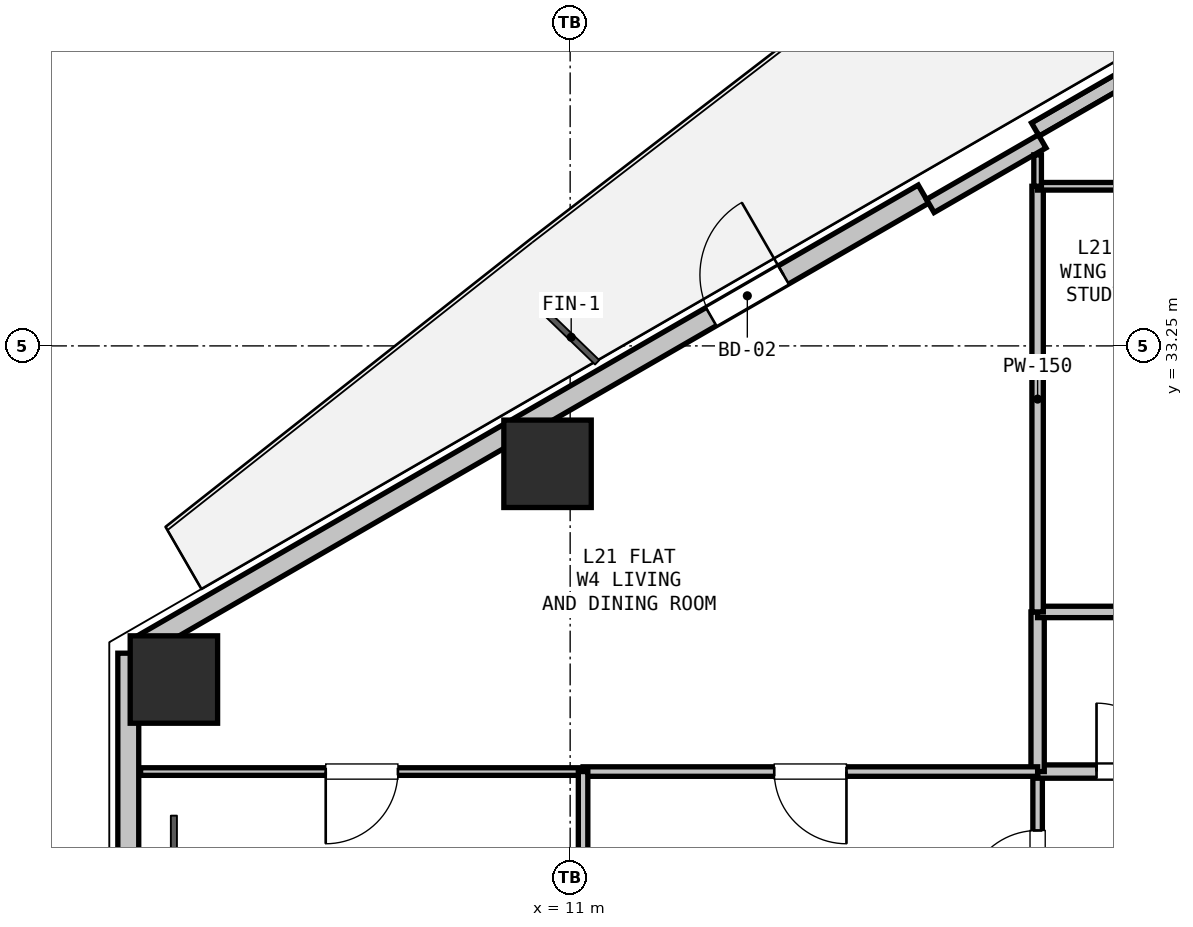
"""IFC4 building model, lengths in metres.
Left out: names, types, materials, properties, quantities, classifications, styles, units other than length and angle.
Written with IfcOpenShell. Run it as: python <this file> out.ifc"""

import sys

from ifc_helpers import new_model, si_unit, direction, frame, frame_2d, origin, origin_2d, place, context, subcontext, project, spatial, rectangle, hollow_rectangle, extrude, element, fill, save


model = new_model("IFC4")
c1 = context("Model", 3, precision=1e-05, world=origin(), true_north=direction((0.0, 1.0)))
c2 = subcontext(c1, "Body", "Model", "MODEL_VIEW")
j1 = project(units=[si_unit("LENGTHUNIT", "METRE"), si_unit("PLANEANGLEUNIT", "RADIAN")], contexts=[c1])
p1 = place(None, origin())
s1 = spatial("IfcSite", under=j1, at=p1, CompositionType="ELEMENT")
p2 = place(p1, origin())
s2 = spatial("IfcBuilding", under=s1, at=p2, CompositionType="ELEMENT")
p3 = place(p2, frame((0.0, 0.0, 80.1)))
s3 = spatial("IfcBuildingStorey", under=s2, at=p3, CompositionType="ELEMENT", Elevation=80.1)
for number, where, z_axis, x_axis in (
    (1, (5.787, 28.861, 0.0), (0.0, 0.0, 1.0), (1.0, 0.0, 0.0)),
    (2, (10.702, 31.699, 0.0), (0.0, 0.0, 1.0), (1.0, 0.0, 0.0)),
):
    element("IfcColumn", number, at=place(p3, frame(where, z_axis=z_axis, x_axis=x_axis)), inside=s3, PredefinedType="COLUMN", context=c2, shape_type="SweptSolid", body=[
        extrude(hollow_rectangle(XDim=1.15, YDim=1.15, WallThickness=0.032, at=origin_2d()), origin(), (0.0, 0.0, 1.0), 3.3),
    ])
p4 = place(p3, frame((5.187, 24.293, 0.0), z_axis=(0.0, 0.0, 1.0), x_axis=(0.0, 1.0, 0.0)))
e3 = element("IfcWall", 3, at=p4, inside=s3, PredefinedType="SOLIDWALL", context=c2, shape_type="SweptSolid", body=[
    extrude(rectangle(XDim=4.915, YDim=0.275, at=frame_2d((2.457, 0.0))), origin(), (0.0, 0.0, 1.0), 2.67),
])
p5 = place(p3, frame((5.317, 29.282, 0.0), z_axis=(0.0, 0.0, 1.0), x_axis=(0.866023023012, 0.500004123596, 0.0)))
e4 = element("IfcWall", 4, at=p5, inside=s3, PredefinedType="SOLIDWALL", context=c2, shape_type="SweptSolid", body=[
    extrude(rectangle(XDim=11.93, YDim=0.275, at=frame_2d((5.965, 0.0))), origin(), (0.0, 0.0, 1.0), 2.67),
])
p6 = place(p5, frame((8.704, 0.0, 0.0)))
e5 = element("IfcOpeningElement", 5, at=p6, cuts=e4, PredefinedType="OPENING", context=c2, shape_type="SweptSolid", body=[
    extrude(rectangle(XDim=1.1, YDim=2.1, at=frame_2d((0.55, 1.05))), frame((0.0, 0.147, 0.0), z_axis=(0.0, -1.0, 0.0), x_axis=(1.0, 0.0, 0.0)), (0.0, 0.0, 1.0), 0.295),
])
p7 = place(p3, frame((17.12, 36.097, 0.0), z_axis=(0.0, 0.0, 1.0), x_axis=(0.866027010039, 0.499997217876, 0.0)))
e6 = element("IfcWall", 6, at=p7, inside=s3, PredefinedType="PARAPET", context=c2, shape_type="SweptSolid", body=[
    extrude(rectangle(XDim=11.229, YDim=0.2, at=frame_2d((5.615, 0.0))), origin(), (0.0, 0.0, 1.0), 0.2),
])
p8 = place(p3, frame((15.738, 35.091, 0.0), z_axis=(0.0, 0.0, 1.0), x_axis=(0.866025371046, 0.500000056704, 0.0)))
e7 = element("IfcWall", 7, at=p8, inside=s3, PredefinedType="PARAPET", context=c2, shape_type="SweptSolid", body=[
    extrude(rectangle(XDim=1.7, YDim=0.2, at=frame_2d((0.85, 0.0))), origin(), (0.0, 0.0, 1.0), 2.67),
])
p9 = place(p3, frame((17.15, 25.15, 0.0), z_axis=(0.0, 0.0, 1.0), x_axis=(0.0, 1.0, 0.0)))
e8 = element("IfcWall", 8, at=p9, inside=s3, PredefinedType="PARTITIONING", context=c2, shape_type="SweptSolid", body=[
    extrude(rectangle(XDim=2.5, YDim=0.125, at=frame_2d((1.25, 0.0))), origin(), (0.0, 0.0, 1.0), 3.05),
])
p10 = place(p9, frame((0.775, 0.0, 0.0)))
e9 = element("IfcOpeningElement", 9, at=p10, cuts=e8, PredefinedType="OPENING", context=c2, shape_type="SweptSolid", body=[
    extrude(rectangle(XDim=0.95, YDim=2.1, at=frame_2d((0.475, 1.05))), frame((0.0, 0.073, 0.0), z_axis=(0.0, -1.0, 0.0), x_axis=(1.0, 0.0, 0.0)), (0.0, 0.0, 1.0), 0.145),
])
p11 = place(p3, frame((17.15, 27.65, 0.0), z_axis=(0.0, 0.0, 1.0), x_axis=(1.0, 0.0, 0.0)))
e10 = element("IfcWall", 10, at=p11, inside=s3, PredefinedType="PLUMBINGWALL", context=c2, shape_type="SweptSolid", body=[
    extrude(rectangle(XDim=2.45, YDim=0.175, at=frame_2d((1.225, 0.0))), origin(), (0.0, 0.0, 1.0), 3.05),
])
p12 = place(p11, frame((0.775, 0.0, 0.0)))
e11 = element("IfcOpeningElement", 11, at=p12, cuts=e10, PredefinedType="OPENING", context=c2, shape_type="SweptSolid", body=[
    extrude(rectangle(XDim=0.9, YDim=2.1, at=frame_2d((0.45, 1.05))), frame((0.0, 0.097, 0.0), z_axis=(0.0, -1.0, 0.0), x_axis=(1.0, 0.0, 0.0)), (0.0, 0.0, 1.0), 0.195),
])
p13 = place(p3, frame((17.15, 27.65, 0.0), z_axis=(0.0, 0.0, 1.0), x_axis=(0.0, 1.0, 0.0)))
e12 = element("IfcWall", 12, at=p13, inside=s3, PredefinedType="PLUMBINGWALL", context=c2, shape_type="SweptSolid", body=[
    extrude(rectangle(XDim=2.1, YDim=0.175, at=frame_2d((1.05, 0.0))), origin(), (0.0, 0.0, 1.0), 3.05),
])
p14 = place(p3, frame((17.15, 29.75, 0.0), z_axis=(0.0, 0.0, 1.0), x_axis=(1.0, 0.0, 0.0)))
e13 = element("IfcWall", 13, at=p14, inside=s3, PredefinedType="PARTITIONING", context=c2, shape_type="SweptSolid", body=[
    extrude(rectangle(XDim=2.45, YDim=0.15, at=frame_2d((1.225, 0.0))), origin(), (0.0, 0.0, 1.0), 3.05),
])
p15 = place(p3, frame((17.15, 29.75, 0.0), z_axis=(0.0, 0.0, 1.0), x_axis=(0.0, 1.0, 0.0)))
e14 = element("IfcWall", 14, at=p15, inside=s3, PredefinedType="PARTITIONING", context=c2, shape_type="SweptSolid", body=[
    extrude(rectangle(XDim=5.6, YDim=0.15, at=frame_2d((2.8, 0.0))), origin(), (0.0, 0.0, 1.0), 2.365),
])
p16 = place(p3, frame((17.15, 35.35, 0.0), z_axis=(0.0, 0.0, 1.0), x_axis=(1.0, 0.0, 0.0)))
e15 = element("IfcWall", 15, at=p16, inside=s3, PredefinedType="PARTITIONING", context=c2, shape_type="SweptSolid", body=[
    extrude(rectangle(XDim=2.45, YDim=0.1, at=frame_2d((1.225, 0.0))), origin(), (0.0, 0.0, 1.0), 2.365),
])
p17 = place(p3, frame((17.15, 35.763, 0.0), z_axis=(0.0, 0.0, 1.0), x_axis=(0.0, -1.0, 0.0)))
e16 = element("IfcWall", 16, at=p17, inside=s3, PredefinedType="PARTITIONING", context=c2, shape_type="SweptSolid", body=[
    extrude(rectangle(XDim=0.413, YDim=0.1, at=frame_2d((0.207, 0.0))), origin(), (0.0, 0.0, 1.0), 2.365),
])
p18 = place(p3, frame((17.15, 27.65, 0.0), z_axis=(0.0, 0.0, 1.0), x_axis=(-1.0, 0.0, 0.0)))
e17 = element("IfcWall", 17, at=p18, inside=s3, PredefinedType="PARTITIONING", context=c2, shape_type="SweptSolid", body=[
    extrude(rectangle(XDim=5.98, YDim=0.125, at=frame_2d((2.99, 0.0))), origin(), (0.0, 0.0, 1.0), 3.05),
])
p19 = place(p18, frame((2.515, 0.0, 0.0)))
e18 = element("IfcOpeningElement", 18, at=p19, cuts=e17, PredefinedType="OPENING", context=c2, shape_type="SweptSolid", body=[
    extrude(rectangle(XDim=0.95, YDim=2.1, at=frame_2d((0.475, 1.05))), frame((0.0, 0.073, 0.0), z_axis=(0.0, -1.0, 0.0), x_axis=(1.0, 0.0, 0.0)), (0.0, 0.0, 1.0), 0.145),
])
p20 = place(p3, frame((11.17, 27.65, 0.0), z_axis=(0.0, 0.0, 1.0), x_axis=(-1.0, 0.0, 0.0)))
e19 = element("IfcWall", 19, at=p20, inside=s3, PredefinedType="PARTITIONING", context=c2, shape_type="SweptSolid", body=[
    extrude(rectangle(XDim=5.822, YDim=0.1, at=frame_2d((2.911, 0.0))), origin(), (0.0, 0.0, 1.0), 2.66),
])
p21 = place(p20, frame((2.436, 0.0, 0.0)))
e20 = element("IfcOpeningElement", 20, at=p21, cuts=e19, PredefinedType="OPENING", context=c2, shape_type="SweptSolid", body=[
    extrude(rectangle(XDim=0.95, YDim=2.1, at=frame_2d((0.475, 1.05))), frame((0.0, 0.06, 0.0), z_axis=(0.0, -1.0, 0.0), x_axis=(1.0, 0.0, 0.0)), (0.0, 0.0, 1.0), 0.12),
])
p22 = place(p3, frame((11.17, 27.65, 0.0), z_axis=(0.0, 0.0, 1.0), x_axis=(0.0, -1.0, 0.0)))
e21 = element("IfcWall", 21, at=p22, inside=s3, PredefinedType="PARTITIONING", context=c2, shape_type="SweptSolid", body=[
    extrude(rectangle(XDim=6.625, YDim=0.125, at=frame_2d((3.312, 0.0))), origin(), (0.0, 0.0, 1.0), 2.365),
])
p23 = place(p22, frame((2.838, 0.0, 0.0)))
e22 = element("IfcOpeningElement", 22, at=p23, cuts=e21, PredefinedType="OPENING", context=c2, shape_type="SweptSolid", body=[
    extrude(rectangle(XDim=0.95, YDim=2.1, at=frame_2d((0.475, 1.05))), frame((0.0, 0.073, 0.0), z_axis=(0.0, -1.0, 0.0), x_axis=(1.0, 0.0, 0.0)), (0.0, 0.0, 1.0), 0.145),
])
p24 = place(p6, origin())
e23 = element("IfcDoor", 23, at=p24, inside=s3, OperationType="SINGLE_SWING_RIGHT", PredefinedType="DOOR", context=c2, shape_type="SweptSolid", body=[
    extrude(rectangle(XDim=1.1, YDim=2.1, at=frame_2d((0.55, 1.05))), frame((0.0, 0.025, 0.0), z_axis=(0.0, -1.0, 0.0), x_axis=(1.0, 0.0, 0.0)), (0.0, 0.0, 1.0), 0.05),
])
fill(e5, e23)
p25 = place(p12, origin())
e24 = element("IfcDoor", 24, at=p25, inside=s3, OperationType="SINGLE_SWING_LEFT", PredefinedType="DOOR", context=c2, shape_type="SweptSolid", body=[
    extrude(rectangle(XDim=0.9, YDim=2.1, at=frame_2d((0.45, 1.05))), frame((0.0, 0.025, 0.0), z_axis=(0.0, -1.0, 0.0), x_axis=(1.0, 0.0, 0.0)), (0.0, 0.0, 1.0), 0.05),
])
fill(e11, e24)
p26 = place(p10, origin())
e25 = element("IfcDoor", 25, at=p26, inside=s3, OperationType="SINGLE_SWING_LEFT", PredefinedType="DOOR", context=c2, shape_type="SweptSolid", body=[
    extrude(rectangle(XDim=0.95, YDim=2.1, at=frame_2d((0.475, 1.05))), frame((0.0, 0.025, 0.0), z_axis=(0.0, -1.0, 0.0), x_axis=(1.0, 0.0, 0.0)), (0.0, 0.0, 1.0), 0.05),
])
fill(e9, e25)
p27 = place(p21, origin())
e26 = element("IfcDoor", 26, at=p27, inside=s3, OperationType="SINGLE_SWING_RIGHT", PredefinedType="DOOR", context=c2, shape_type="SweptSolid", body=[
    extrude(rectangle(XDim=0.95, YDim=2.1, at=frame_2d((0.475, 1.05))), frame((0.0, 0.025, 0.0), z_axis=(0.0, -1.0, 0.0), x_axis=(1.0, 0.0, 0.0)), (0.0, 0.0, 1.0), 0.05),
])
fill(e20, e26)
p28 = place(p19, origin())
e27 = element("IfcDoor", 27, at=p28, inside=s3, OperationType="SINGLE_SWING_LEFT", PredefinedType="DOOR", context=c2, shape_type="SweptSolid", body=[
    extrude(rectangle(XDim=0.95, YDim=2.1, at=frame_2d((0.475, 1.05))), frame((0.0, 0.025, 0.0), z_axis=(0.0, -1.0, 0.0), x_axis=(1.0, 0.0, 0.0)), (0.0, 0.0, 1.0), 0.05),
])
fill(e18, e27)
save(model, sys.argv[1])
